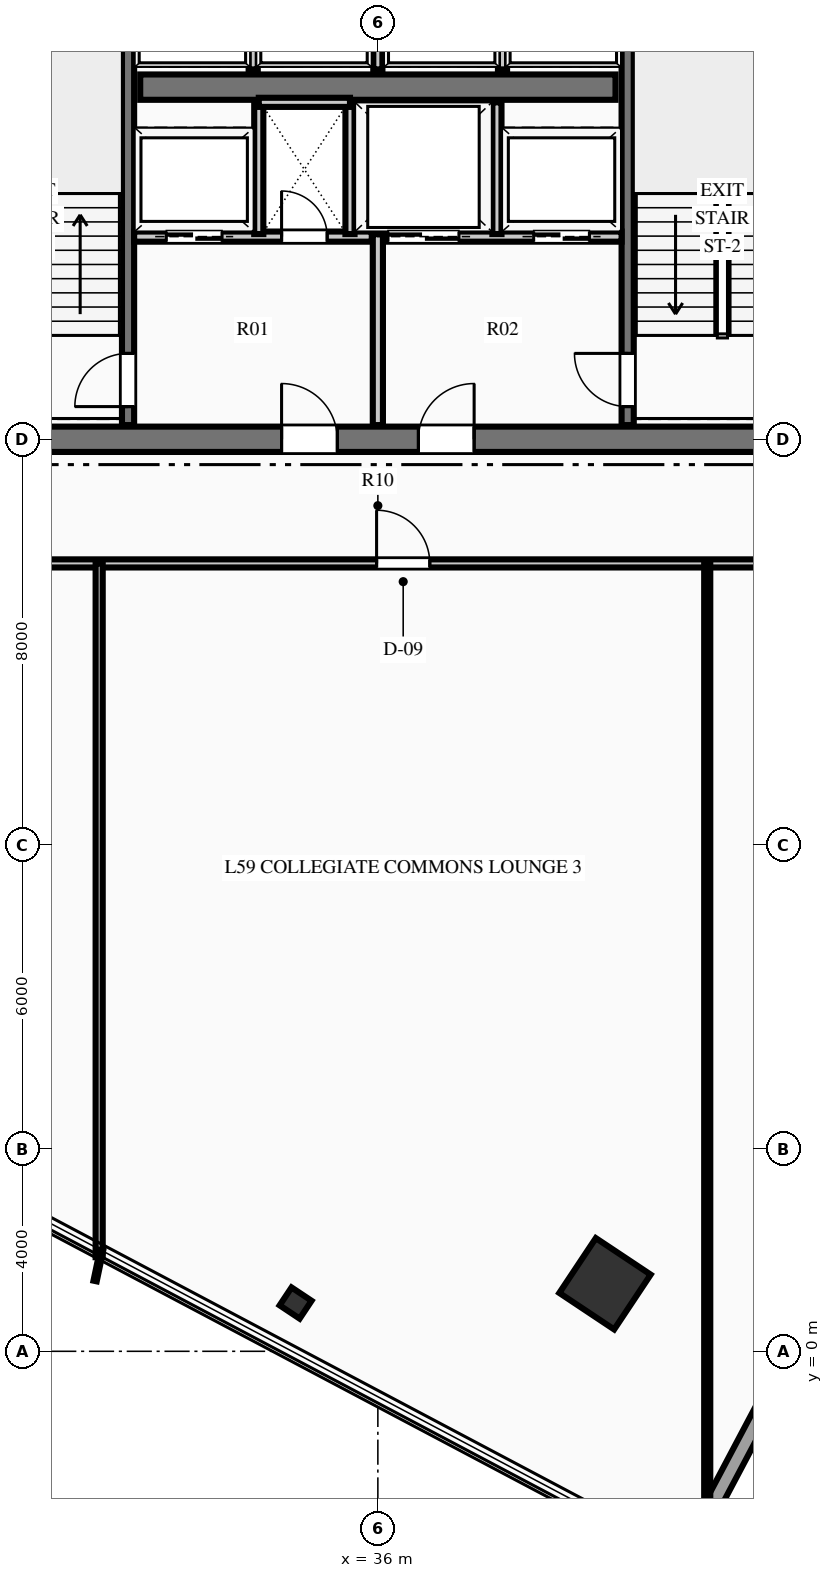
"""IFC4 building model, lengths in metres.
Left out: names, types, materials, properties, quantities, classifications, styles, units other than length and angle.
Written with IfcOpenShell. Run it as: python <this file> out.ifc"""

import sys

from ifc_helpers import new_model, si_unit, direction, frame, frame_2d, origin, origin_2d, place, context, subcontext, project, spatial, rectangle, hollow_rectangle, i_section, extrude, element, fill, save


model = new_model("IFC4")
c1 = context("Model", 3, precision=1e-05, world=origin(), true_north=direction((0.0, 1.0)))
c2 = subcontext(c1, "Body", "Model", "MODEL_VIEW")
j1 = project(units=[si_unit("LENGTHUNIT", "METRE"), si_unit("PLANEANGLEUNIT", "RADIAN")], contexts=[c1])
p1 = place(None, origin())
s1 = spatial("IfcSite", under=j1, at=p1, CompositionType="ELEMENT")
p2 = place(p1, origin())
s2 = spatial("IfcBuilding", under=s1, at=p2, CompositionType="ELEMENT")
p3 = place(p2, frame((0.0, 0.0, 235.95)))
s3 = spatial("IfcBuildingStorey", under=s2, at=p3, CompositionType="ELEMENT", Elevation=235.95)
p4 = place(p3, frame((26.75, 18.0, 0.0), z_axis=(0.0, 0.0, 1.0), x_axis=(1.0, 0.0, 0.0)))
e1 = element("IfcWall", 1, at=p4, inside=s3, PredefinedType="SHEAR", context=c2, shape_type="SweptSolid", body=[
    extrude(rectangle(XDim=18.5, YDim=0.5, at=frame_2d((9.25, 0.0))), origin(), (0.0, 0.0, 1.0), 3.75),
])
p5 = place(p4, frame((7.35, 0.0, 0.0)))
e2 = element("IfcOpeningElement", 2, at=p5, cuts=e1, PredefinedType="OPENING", context=c2, shape_type="SweptSolid", body=[
    extrude(rectangle(XDim=1.1, YDim=2.15, at=frame_2d((0.55, 1.075))), frame((0.0, 0.26, 0.0), z_axis=(0.0, -1.0, 0.0), x_axis=(1.0, 0.0, 0.0)), (0.0, 0.0, 1.0), 0.52),
])
p6 = place(p4, frame((10.05, 0.0, 0.0)))
e3 = element("IfcOpeningElement", 3, at=p6, cuts=e1, PredefinedType="OPENING", context=c2, shape_type="SweptSolid", body=[
    extrude(rectangle(XDim=1.1, YDim=2.15, at=frame_2d((0.55, 1.075))), frame((0.0, 0.26, 0.0), z_axis=(0.0, -1.0, 0.0), x_axis=(1.0, 0.0, 0.0)), (0.0, 0.0, 1.0), 0.52),
])
p7 = place(p3, frame((31.31, 24.95, 0.0), z_axis=(0.0, 0.0, 1.0), x_axis=(1.0, 0.0, 0.0)))
e4 = element("IfcWall", 4, at=p7, inside=s3, PredefinedType="SHEAR", context=c2, shape_type="SweptSolid", body=[
    extrude(rectangle(XDim=9.38, YDim=0.5, at=frame_2d((4.69, 0.0))), origin(), (0.0, 0.0, 1.0), 3.75),
])
p8 = place(p3, frame((31.07, 18.28, 0.0), z_axis=(0.0, 0.0, 1.0), x_axis=(0.0, 1.0, 0.0)))
e5 = element("IfcWall", 5, at=p8, inside=s3, PredefinedType="SHEAR", context=c2, shape_type="SweptSolid", body=[
    extrude(rectangle(XDim=8.26, YDim=0.24, at=frame_2d((4.13, 0.0))), origin(), (0.0, 0.0, 1.0), 3.75),
])
p9 = place(p8, frame((0.365, 0.0, 0.0)))
e6 = element("IfcOpeningElement", 6, at=p9, cuts=e5, PredefinedType="OPENING", context=c2, shape_type="SweptSolid", body=[
    extrude(rectangle(XDim=1.05, YDim=2.15, at=frame_2d((0.525, 1.075))), frame((0.0, 0.13, 0.0), z_axis=(0.0, -1.0, 0.0), x_axis=(1.0, 0.0, 0.0)), (0.0, 0.0, 1.0), 0.26),
])
p10 = place(p3, frame((40.93, 18.28, 0.0), z_axis=(0.0, 0.0, 1.0), x_axis=(0.0, 1.0, 0.0)))
e7 = element("IfcWall", 7, at=p10, inside=s3, PredefinedType="SHEAR", context=c2, shape_type="SweptSolid", body=[
    extrude(rectangle(XDim=8.26, YDim=0.24, at=frame_2d((4.13, 0.0))), origin(), (0.0, 0.0, 1.0), 3.75),
])
p11 = place(p10, frame((0.365, 0.0, 0.0)))
e8 = element("IfcOpeningElement", 8, at=p11, cuts=e7, PredefinedType="OPENING", context=c2, shape_type="SweptSolid", body=[
    extrude(rectangle(XDim=1.05, YDim=2.15, at=frame_2d((0.525, 1.075))), frame((0.0, 0.13, 0.0), z_axis=(0.0, -1.0, 0.0), x_axis=(1.0, 0.0, 0.0)), (0.0, 0.0, 1.0), 0.26),
])
p12 = place(p3, frame((40.483, 1.333, 0.0), z_axis=(0.0, 0.0, 1.0), x_axis=(0.554118199338, 0.832437998389, 0.0)))
e9 = element("IfcColumn", 9, at=p12, inside=s3, PredefinedType="COLUMN", context=c2, shape_type="SweptSolid", body=[
    extrude(hollow_rectangle(XDim=1.3, YDim=1.3, WallThickness=0.06, at=origin_2d()), origin(), (0.0, 0.0, 1.0), 3.75),
])
p13 = place(p3, frame((34.377, 0.952, 0.0), z_axis=(0.0, 0.0, 1.0), x_axis=(0.554118199338, 0.832437998389, 0.0)))
e10 = element("IfcColumn", 10, at=p13, inside=s3, PredefinedType="COLUMN", context=c2, shape_type="SweptSolid", body=[
    extrude(i_section(OverallWidth=0.424, OverallDepth=0.474, WebThickness=0.048, FlangeThickness=0.077, at=origin_2d()), origin(), (0.0, 0.0, 1.0), 3.75),
])
p14 = place(p3, frame((43.785, -0.809, 0.0), z_axis=(0.0, 0.0, 1.0), x_axis=(-0.46795099814, -0.883754413477, 0.0)))
e11 = element("IfcWall", 11, at=p14, inside=s3, PredefinedType="STANDARD", context=c2, shape_type="SweptSolid", body=[
    extrude(rectangle(XDim=3.9, YDim=0.32, at=frame_2d((1.95, 0.0))), origin(), (0.0, 0.0, 1.0), 3.4),
])
p15 = place(p3, frame((36.0, 18.28, 0.0), z_axis=(0.0, 0.0, 1.0), x_axis=(0.0, 1.0, 0.0)))
e12 = element("IfcWall", 12, at=p15, inside=s3, PredefinedType="PARTITIONING", context=c2, shape_type="SweptSolid", body=[
    extrude(rectangle(XDim=3.77, YDim=0.2, at=frame_2d((1.885, 0.0))), origin(), (0.0, 0.0, 1.0), 3.4),
])
p16 = place(p3, frame((31.19, 22.0, 0.0), z_axis=(0.0, 0.0, 1.0), x_axis=(1.0, 0.0, 0.0)))
e13 = element("IfcWall", 13, at=p16, inside=s3, PredefinedType="PARTITIONING", context=c2, shape_type="SweptSolid", body=[
    extrude(rectangle(XDim=4.69, YDim=0.2, at=frame_2d((2.345, 0.0))), origin(), (0.0, 0.0, 1.0), 3.4),
])
p17 = place(p16, frame((2.91, 0.0, 0.0)))
e14 = element("IfcOpeningElement", 14, at=p17, cuts=e13, PredefinedType="OPENING", context=c2, shape_type="SweptSolid", body=[
    extrude(rectangle(XDim=0.9, YDim=2.15, at=frame_2d((0.45, 1.075))), frame((0.0, 0.11, 0.0), z_axis=(0.0, -1.0, 0.0), x_axis=(1.0, 0.0, 0.0)), (0.0, 0.0, 1.0), 0.22),
])
p18 = place(p16, frame((0.635, 0.0, 0.0)))
e15 = element("IfcOpeningElement", 15, at=p18, cuts=e13, PredefinedType="OPENING", context=c2, shape_type="SweptSolid", body=[
    extrude(rectangle(XDim=1.1, YDim=2.15, at=frame_2d((0.55, 1.075))), frame((0.0, 0.11, 0.0), z_axis=(0.0, -1.0, 0.0), x_axis=(1.0, 0.0, 0.0)), (0.0, 0.0, 1.0), 0.22),
])
p19 = place(p3, frame((36.12, 22.0, 0.0), z_axis=(0.0, 0.0, 1.0), x_axis=(1.0, 0.0, 0.0)))
e16 = element("IfcWall", 16, at=p19, inside=s3, PredefinedType="PARTITIONING", context=c2, shape_type="SweptSolid", body=[
    extrude(rectangle(XDim=4.69, YDim=0.2, at=frame_2d((2.345, 0.0))), origin(), (0.0, 0.0, 1.0), 3.4),
])
p20 = place(p19, frame((2.955, 0.0, 0.0)))
e17 = element("IfcOpeningElement", 17, at=p20, cuts=e16, PredefinedType="OPENING", context=c2, shape_type="SweptSolid", body=[
    extrude(rectangle(XDim=1.1, YDim=2.15, at=frame_2d((0.55, 1.075))), frame((0.0, 0.11, 0.0), z_axis=(0.0, -1.0, 0.0), x_axis=(1.0, 0.0, 0.0)), (0.0, 0.0, 1.0), 0.22),
])
p21 = place(p19, frame((0.08, 0.0, 0.0)))
e18 = element("IfcOpeningElement", 18, at=p21, cuts=e16, PredefinedType="OPENING", context=c2, shape_type="SweptSolid", body=[
    extrude(rectangle(XDim=1.4, YDim=2.2, at=frame_2d((0.7, 1.1))), frame((0.0, 0.11, 0.0), z_axis=(0.0, -1.0, 0.0), x_axis=(1.0, 0.0, 0.0)), (0.0, 0.0, 1.0), 0.22),
])
for number, where, z_axis, x_axis in (
    (19, (33.65, 22.05, 0.0), (0.0, 0.0, 1.0), (0.0, 1.0, 0.0)),
    (20, (35.45, 22.05, 0.0), (0.0, 0.0, 1.0), (0.0, 1.0, 0.0)),
):
    element("IfcWall", number, at=place(p3, frame(where, z_axis=z_axis, x_axis=x_axis)), inside=s3, PredefinedType="PARTITIONING", context=c2, shape_type="SweptSolid", body=[
        extrude(rectangle(XDim=2.6, YDim=0.18, at=frame_2d((1.3, 0.0))), origin(), (0.0, 0.0, 1.0), 3.4),
    ])
p22 = place(p3, frame((33.65, 24.65, 0.0), z_axis=(0.0, 0.0, 1.0), x_axis=(1.0, 0.0, 0.0)))
e21 = element("IfcWall", 21, at=p22, inside=s3, PredefinedType="PARTITIONING", context=c2, shape_type="SweptSolid", body=[
    extrude(rectangle(XDim=1.8, YDim=0.18, at=frame_2d((0.9, 0.0))), origin(), (0.0, 0.0, 1.0), 3.4),
])
p23 = place(p3, frame((38.35, 22.05, 0.0), z_axis=(0.0, 0.0, 1.0), x_axis=(0.0, 1.0, 0.0)))
e22 = element("IfcWall", 22, at=p23, inside=s3, PredefinedType="PARTITIONING", context=c2, shape_type="SweptSolid", body=[
    extrude(rectangle(XDim=2.6, YDim=0.18, at=frame_2d((1.3, 0.0))), origin(), (0.0, 0.0, 1.0), 3.4),
])
for number, where, z_axis, x_axis in (
    (23, (33.54, 25.3, 0.0), (0.0, 0.0, 1.0), (0.0, 1.0, 0.0)),
    (24, (36.0, 25.3, 0.0), (0.0, 0.0, 1.0), (0.0, 1.0, 0.0)),
    (25, (38.46, 25.3, 0.0), (0.0, 0.0, 1.0), (0.0, 1.0, 0.0)),
):
    element("IfcWall", number, at=place(p3, frame(where, z_axis=z_axis, x_axis=x_axis)), inside=s3, PredefinedType="PARTITIONING", context=c2, shape_type="SweptSolid", body=[
        extrude(rectangle(XDim=1.9, YDim=0.18, at=frame_2d((0.95, 0.0))), origin(), (0.0, 0.0, 1.0), 3.4),
    ])
p24 = place(p3, frame((18.2, 15.55, 0.0), z_axis=(0.0, 0.0, 1.0), x_axis=(1.0, 0.0, 0.0)))
e26 = element("IfcWall", 26, at=p24, inside=s3, PredefinedType="PARTITIONING", context=c2, shape_type="SweptSolid", body=[
    extrude(rectangle(XDim=35.6, YDim=0.16, at=frame_2d((17.8, 0.0))), origin(), (0.0, 0.0, 1.0), 2.938),
])
p25 = place(p24, frame((2.625, 0.0, 0.0)))
e27 = element("IfcOpeningElement", 27, at=p25, cuts=e26, PredefinedType="OPENING", context=c2, shape_type="SweptSolid", body=[
    extrude(rectangle(XDim=1.05, YDim=2.15, at=frame_2d((0.525, 1.075))), frame((0.0, 0.09, 0.0), z_axis=(0.0, -1.0, 0.0), x_axis=(1.0, 0.0, 0.0)), (0.0, 0.0, 1.0), 0.18),
])
p26 = place(p24, frame((9.335, 0.0, 0.0)))
e28 = element("IfcOpeningElement", 28, at=p26, cuts=e26, PredefinedType="OPENING", context=c2, shape_type="SweptSolid", body=[
    extrude(rectangle(XDim=1.05, YDim=2.15, at=frame_2d((0.525, 1.075))), frame((0.0, 0.09, 0.0), z_axis=(0.0, -1.0, 0.0), x_axis=(1.0, 0.0, 0.0)), (0.0, 0.0, 1.0), 0.18),
])
p27 = place(p24, frame((17.775, 0.0, 0.0)))
e29 = element("IfcOpeningElement", 29, at=p27, cuts=e26, PredefinedType="OPENING", context=c2, shape_type="SweptSolid", body=[
    extrude(rectangle(XDim=1.05, YDim=2.15, at=frame_2d((0.525, 1.075))), frame((0.0, 0.09, 0.0), z_axis=(0.0, -1.0, 0.0), x_axis=(1.0, 0.0, 0.0)), (0.0, 0.0, 1.0), 0.18),
])
p28 = place(p24, frame((26.055, 0.0, 0.0)))
e30 = element("IfcOpeningElement", 30, at=p28, cuts=e26, PredefinedType="OPENING", context=c2, shape_type="SweptSolid", body=[
    extrude(rectangle(XDim=1.05, YDim=2.15, at=frame_2d((0.525, 1.075))), frame((0.0, 0.09, 0.0), z_axis=(0.0, -1.0, 0.0), x_axis=(1.0, 0.0, 0.0)), (0.0, 0.0, 1.0), 0.18),
])
p29 = place(p24, frame((32.265, 0.0, 0.0)))
e31 = element("IfcOpeningElement", 31, at=p29, cuts=e26, PredefinedType="OPENING", context=c2, shape_type="SweptSolid", body=[
    extrude(rectangle(XDim=1.05, YDim=2.15, at=frame_2d((0.525, 1.075))), frame((0.0, 0.09, 0.0), z_axis=(0.0, -1.0, 0.0), x_axis=(1.0, 0.0, 0.0)), (0.0, 0.0, 1.0), 0.18),
])
p30 = place(p3, frame((30.5, 1.857, 0.0), z_axis=(0.0, 0.0, 1.0), x_axis=(0.0, 1.0, 0.0)))
e32 = element("IfcWall", 32, at=p30, inside=s3, PredefinedType="PARTITIONING", context=c2, shape_type="SweptSolid", body=[
    extrude(rectangle(XDim=13.693, YDim=0.14, at=frame_2d((6.846, 0.0))), origin(), (0.0, 0.0, 1.0), 3.4),
])
p31 = place(p3, frame((42.5, -3.151, 0.0), z_axis=(0.0, 0.0, 1.0), x_axis=(0.0, 1.0, 0.0)))
e33 = element("IfcWall", 33, at=p31, inside=s3, PredefinedType="PARTITIONING", context=c2, shape_type="SweptSolid", body=[
    extrude(rectangle(XDim=18.701, YDim=0.12, at=frame_2d((9.351, 0.0))), origin(), (0.0, 0.0, 1.0), 3.4),
])
p32 = place(p9, origin())
e34 = element("IfcDoor", 34, at=p32, inside=s3, OperationType="SINGLE_SWING_LEFT", PredefinedType="DOOR", context=c2, shape_type="SweptSolid", body=[
    extrude(rectangle(XDim=1.05, YDim=2.15, at=frame_2d((0.525, 1.075))), frame((0.0, 0.025, 0.0), z_axis=(0.0, -1.0, 0.0), x_axis=(1.0, 0.0, 0.0)), (0.0, 0.0, 1.0), 0.05),
])
fill(e6, e34)
p33 = place(p11, origin())
e35 = element("IfcDoor", 35, at=p33, inside=s3, OperationType="SINGLE_SWING_RIGHT", PredefinedType="DOOR", context=c2, shape_type="SweptSolid", body=[
    extrude(rectangle(XDim=1.05, YDim=2.15, at=frame_2d((0.525, 1.075))), frame((0.0, 0.025, 0.0), z_axis=(0.0, -1.0, 0.0), x_axis=(1.0, 0.0, 0.0)), (0.0, 0.0, 1.0), 0.05),
])
fill(e8, e35)
p34 = place(p5, origin())
e36 = element("IfcDoor", 36, at=p34, inside=s3, OperationType="SINGLE_SWING_LEFT", PredefinedType="DOOR", context=c2, shape_type="SweptSolid", body=[
    extrude(rectangle(XDim=1.1, YDim=2.15, at=frame_2d((0.55, 1.075))), frame((0.0, 0.025, 0.0), z_axis=(0.0, -1.0, 0.0), x_axis=(1.0, 0.0, 0.0)), (0.0, 0.0, 1.0), 0.05),
])
fill(e2, e36)
p35 = place(p6, origin())
e37 = element("IfcDoor", 37, at=p35, inside=s3, OperationType="SINGLE_SWING_RIGHT", PredefinedType="DOOR", context=c2, shape_type="SweptSolid", body=[
    extrude(rectangle(XDim=1.1, YDim=2.15, at=frame_2d((0.55, 1.075))), frame((0.0, 0.025, 0.0), z_axis=(0.0, -1.0, 0.0), x_axis=(1.0, 0.0, 0.0)), (0.0, 0.0, 1.0), 0.05),
])
fill(e3, e37)
p36 = place(p17, origin())
e38 = element("IfcDoor", 38, at=p36, inside=s3, OperationType="SINGLE_SWING_LEFT", PredefinedType="DOOR", context=c2, shape_type="SweptSolid", body=[
    extrude(rectangle(XDim=0.9, YDim=2.15, at=frame_2d((0.45, 1.075))), frame((0.0, 0.025, 0.0), z_axis=(0.0, -1.0, 0.0), x_axis=(1.0, 0.0, 0.0)), (0.0, 0.0, 1.0), 0.05),
])
fill(e14, e38)
p37 = place(p27, origin())
e39 = element("IfcDoor", 39, at=p37, inside=s3, OperationType="SINGLE_SWING_LEFT", PredefinedType="DOOR", context=c2, shape_type="SweptSolid", body=[
    extrude(rectangle(XDim=1.05, YDim=2.15, at=frame_2d((0.525, 1.075))), frame((0.0, 0.025, 0.0), z_axis=(0.0, -1.0, 0.0), x_axis=(1.0, 0.0, 0.0)), (0.0, 0.0, 1.0), 0.05),
])
fill(e29, e39)
p38 = place(p18, origin())
e40 = element("IfcDoor", 40, at=p38, inside=s3, OperationType="SLIDING_TO_LEFT", PredefinedType="DOOR", context=c2, shape_type="SweptSolid", body=[
    extrude(rectangle(XDim=1.1, YDim=2.15, at=frame_2d((0.55, 1.075))), frame((0.0, 0.025, 0.0), z_axis=(0.0, -1.0, 0.0), x_axis=(1.0, 0.0, 0.0)), (0.0, 0.0, 1.0), 0.05),
])
fill(e15, e40)
p39 = place(p20, origin())
e41 = element("IfcDoor", 41, at=p39, inside=s3, OperationType="SLIDING_TO_LEFT", PredefinedType="DOOR", context=c2, shape_type="SweptSolid", body=[
    extrude(rectangle(XDim=1.1, YDim=2.15, at=frame_2d((0.55, 1.075))), frame((0.0, 0.025, 0.0), z_axis=(0.0, -1.0, 0.0), x_axis=(1.0, 0.0, 0.0)), (0.0, 0.0, 1.0), 0.05),
])
fill(e17, e41)
p40 = place(p21, origin())
e42 = element("IfcDoor", 42, at=p40, inside=s3, OperationType="SLIDING_TO_LEFT", PredefinedType="DOOR", context=c2, shape_type="SweptSolid", body=[
    extrude(rectangle(XDim=1.4, YDim=2.2, at=frame_2d((0.7, 1.1))), frame((0.0, 0.025, 0.0), z_axis=(0.0, -1.0, 0.0), x_axis=(1.0, 0.0, 0.0)), (0.0, 0.0, 1.0), 0.05),
])
fill(e18, e42)
save(model, sys.argv[1])
